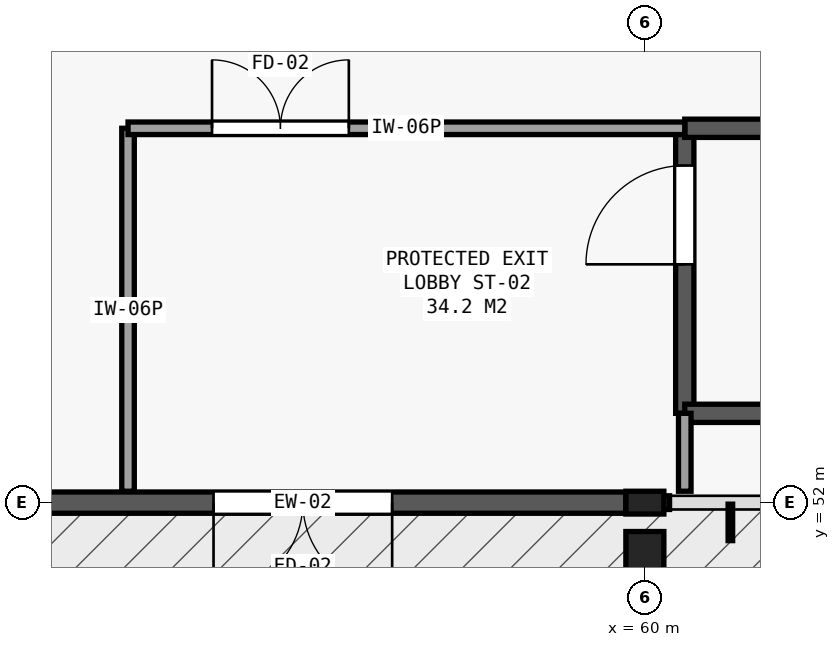
"""IFC4 building model, lengths in metres.
Left out: names, types, materials, properties, quantities, classifications, styles, units other than length and angle.
Written with IfcOpenShell. Run it as: python <this file> out.ifc"""

import sys

from ifc_helpers import new_model, si_unit, direction, frame, frame_2d, origin, origin_2d, place, context, subcontext, project, spatial, rectangle, i_section, extrude, element, fill, save


model = new_model("IFC4")
c1 = context("Model", 3, precision=1e-05, world=origin(), true_north=direction((0.0, 1.0)))
c2 = subcontext(c1, "Body", "Model", "MODEL_VIEW")
j1 = project(units=[si_unit("LENGTHUNIT", "METRE"), si_unit("PLANEANGLEUNIT", "RADIAN")], contexts=[c1])
p1 = place(None, origin())
s1 = spatial("IfcSite", under=j1, at=p1, CompositionType="ELEMENT")
p2 = place(p1, origin())
s2 = spatial("IfcBuilding", under=s1, at=p2, CompositionType="ELEMENT")
p3 = place(p2, origin())
s3 = spatial("IfcBuildingStorey", under=s2, at=p3, CompositionType="ELEMENT", Elevation=0.0)
p4 = place(p3, frame((60.0, 51.17, 0.0), z_axis=(0.0, 0.0, 1.0), x_axis=(1.0, 0.0, 0.0)))
e1 = element("IfcColumn", 1, at=p4, inside=s3, PredefinedType="PILASTER", context=c2, shape_type="SweptSolid", body=[
    extrude(rectangle(XDim=0.5, YDim=0.9, at=origin_2d()), origin(), (0.0, 0.0, 1.0), 5.4),
])
p5 = place(p3, frame((60.0, 52.0, 0.0), z_axis=(0.0, 0.0, 1.0), x_axis=(0.0, 1.0, 0.0)))
e2 = element("IfcColumn", 2, at=p5, inside=s3, PredefinedType="COLUMN", context=c2, shape_type="SweptSolid", body=[
    extrude(i_section(OverallWidth=0.3, OverallDepth=0.5, WebThickness=0.014, FlangeThickness=0.028, FilletRadius=0.027, at=origin_2d()), origin(), (0.0, 0.0, 1.0), 5.4),
])
p6 = place(p3, frame((59.75, 52.0, 0.0), z_axis=(0.0, 0.0, 1.0), x_axis=(-1.0, 0.0, 0.0)))
e3 = element("IfcWall", 3, at=p6, inside=s3, PredefinedType="SOLIDWALL", context=c2, shape_type="SweptSolid", body=[
    extrude(rectangle(XDim=8.5, YDim=0.28, at=frame_2d((4.25, 0.0))), origin(), (0.0, 0.0, 1.0), 5.1),
])
p7 = place(p6, frame((3.075, 0.0, 0.0)))
e4 = element("IfcOpeningElement", 4, at=p7, cuts=e3, PredefinedType="OPENING", context=c2, shape_type="SweptSolid", body=[
    extrude(rectangle(XDim=2.35, YDim=2.45, at=frame_2d((1.175, 1.225))), frame((0.0, 0.15, 0.0), z_axis=(0.0, -1.0, 0.0), x_axis=(1.0, 0.0, 0.0)), (0.0, 0.0, 1.0), 0.3),
])
p8 = place(p3, frame((60.525, 53.175, 0.0), z_axis=(0.0, 0.0, 1.0), x_axis=(0.0, 1.0, 0.0)))
e5 = element("IfcWall", 5, at=p8, inside=s3, PredefinedType="SOLIDWALL", context=c2, shape_type="SweptSolid", body=[
    extrude(rectangle(XDim=3.75, YDim=0.24, at=frame_2d((1.875, 0.0))), origin(), (0.0, 0.0, 1.0), 5.16),
])
p9 = place(p8, frame((1.96, 0.0, 0.0)))
e6 = element("IfcOpeningElement", 6, at=p9, cuts=e5, PredefinedType="OPENING", context=c2, shape_type="SweptSolid", body=[
    extrude(rectangle(XDim=1.3, YDim=2.15, at=frame_2d((0.65, 1.075))), frame((0.0, 0.13, 0.0), z_axis=(0.0, -1.0, 0.0), x_axis=(1.0, 0.0, 0.0)), (0.0, 0.0, 1.0), 0.26),
])
for number, where, z_axis, x_axis in (
    (7, (68.525, 53.175, 0.0), (0.0, 0.0, 1.0), (-1.0, 0.0, 0.0)),
    (8, (60.525, 56.925, 0.0), (0.0, 0.0, 1.0), (1.0, 0.0, 0.0)),
):
    element("IfcWall", number, at=place(p3, frame(where, z_axis=z_axis, x_axis=x_axis)), inside=s3, PredefinedType="SOLIDWALL", context=c2, shape_type="SweptSolid", body=[
        extrude(rectangle(XDim=8.0, YDim=0.24, at=frame_2d((4.0, 0.0))), origin(), (0.0, 0.0, 1.0), 5.16),
    ])
p10 = place(p3, frame((53.2, 52.15, 0.0), z_axis=(0.0, 0.0, 1.0), x_axis=(0.0, 1.0, 0.0)))
e9 = element("IfcWall", 9, at=p10, inside=s3, PredefinedType="PARTITIONING", context=c2, shape_type="SweptSolid", body=[
    extrude(rectangle(XDim=4.775, YDim=0.165, at=frame_2d((2.388, 0.0))), origin(), (0.0, 0.0, 1.0), 5.08),
])
p11 = place(p3, frame((53.2, 56.925, 0.0), z_axis=(0.0, 0.0, 1.0), x_axis=(1.0, 0.0, 0.0)))
e10 = element("IfcWall", 10, at=p11, inside=s3, PredefinedType="PARTITIONING", context=c2, shape_type="SweptSolid", body=[
    extrude(rectangle(XDim=7.325, YDim=0.165, at=frame_2d((3.663, 0.0))), origin(), (0.0, 0.0, 1.0), 4.71),
])
p12 = place(p11, frame((1.105, 0.0, 0.0)))
e11 = element("IfcOpeningElement", 11, at=p12, cuts=e10, PredefinedType="OPENING", context=c2, shape_type="SweptSolid", body=[
    extrude(rectangle(XDim=1.8, YDim=2.2, at=frame_2d((0.9, 1.1))), frame((0.0, 0.093, 0.0), z_axis=(0.0, -1.0, 0.0), x_axis=(1.0, 0.0, 0.0)), (0.0, 0.0, 1.0), 0.185),
])
p13 = place(p3, frame((60.525, 52.15, 0.0), z_axis=(0.0, 0.0, 1.0), x_axis=(0.0, 1.0, 0.0)))
e12 = element("IfcWall", 12, at=p13, inside=s3, PredefinedType="PARTITIONING", context=c2, shape_type="SweptSolid", body=[
    extrude(rectangle(XDim=1.025, YDim=0.165, at=frame_2d((0.513, 0.0))), origin(), (0.0, 0.0, 1.0), 5.08),
])
p14 = place(p7, origin())
e13 = element("IfcDoor", 13, at=p14, inside=s3, OperationType="DOUBLE_DOOR_SINGLE_SWING", PredefinedType="DOOR", context=c2, shape_type="SweptSolid", body=[
    extrude(rectangle(XDim=2.35, YDim=2.45, at=frame_2d((1.175, 1.225))), frame((0.0, 0.025, 0.0), z_axis=(0.0, -1.0, 0.0), x_axis=(1.0, 0.0, 0.0)), (0.0, 0.0, 1.0), 0.05),
])
fill(e4, e13)
p15 = place(p9, origin())
e14 = element("IfcDoor", 14, at=p15, inside=s3, OperationType="SINGLE_SWING_LEFT", PredefinedType="DOOR", context=c2, shape_type="SweptSolid", body=[
    extrude(rectangle(XDim=1.3, YDim=2.15, at=frame_2d((0.65, 1.075))), frame((0.0, 0.025, 0.0), z_axis=(0.0, -1.0, 0.0), x_axis=(1.0, 0.0, 0.0)), (0.0, 0.0, 1.0), 0.05),
])
fill(e6, e14)
p16 = place(p12, origin())
e15 = element("IfcDoor", 15, at=p16, inside=s3, OperationType="DOUBLE_DOOR_SINGLE_SWING", PredefinedType="DOOR", context=c2, shape_type="SweptSolid", body=[
    extrude(rectangle(XDim=1.8, YDim=2.2, at=frame_2d((0.9, 1.1))), frame((0.0, 0.025, 0.0), z_axis=(0.0, -1.0, 0.0), x_axis=(1.0, 0.0, 0.0)), (0.0, 0.0, 1.0), 0.05),
])
fill(e11, e15)
save(model, sys.argv[1])
